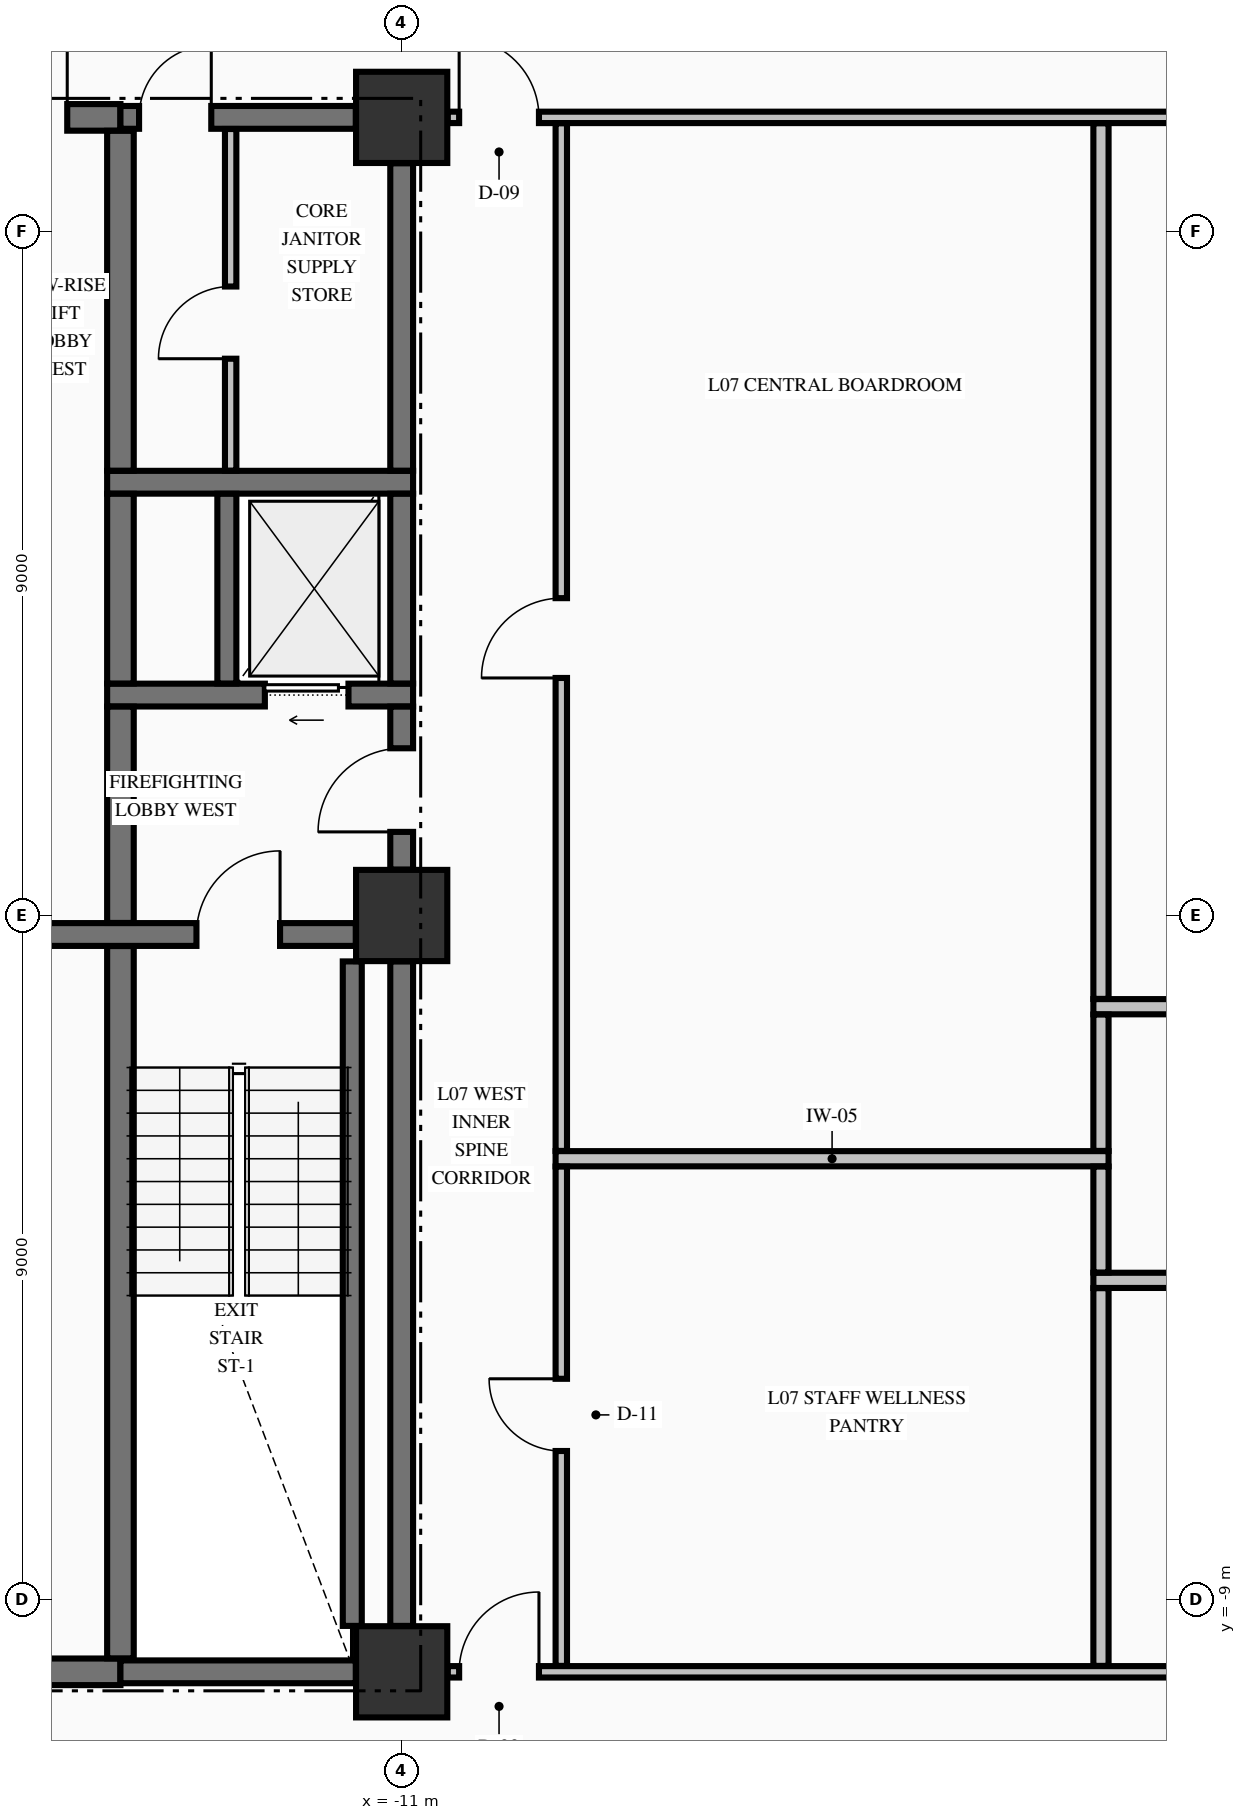
"""IFC4 building model, lengths in metres.
Left out: names, types, materials, properties, quantities, classifications, styles, units other than length and angle.
Written with IfcOpenShell. Run it as: python <this file> out.ifc"""

import sys

from ifc_helpers import new_model, si_unit, direction, frame, frame_2d, origin, origin_2d, place, context, subcontext, project, spatial, rectangle, extrude, element, fill, save


model = new_model("IFC4")
c1 = context("Model", 3, precision=1e-05, world=origin(), true_north=direction((0.0, 1.0)))
c2 = subcontext(c1, "Body", "Model", "MODEL_VIEW")
j1 = project(units=[si_unit("LENGTHUNIT", "METRE"), si_unit("PLANEANGLEUNIT", "RADIAN")], contexts=[c1])
p1 = place(None, origin())
s1 = spatial("IfcSite", under=j1, at=p1, CompositionType="ELEMENT")
p2 = place(p1, origin())
s2 = spatial("IfcBuilding", under=s1, at=p2, CompositionType="ELEMENT")
p3 = place(p2, frame((0.0, 0.0, 34.34)))
s3 = spatial("IfcBuildingStorey", under=s2, at=p3, CompositionType="ELEMENT", Elevation=34.34)
for number, where, z_axis, x_axis in (
    (1, (-11.0, -9.95, -0.3), (0.0, 0.0, 1.0), (1.0, 0.0, 0.0)),
    (2, (-11.0, 0.0, -0.3), (0.0, 0.0, 1.0), (1.0, 0.0, 0.0)),
    (3, (-11.0, 10.5, -0.3), (0.0, 0.0, 1.0), (1.0, 0.0, 0.0)),
):
    element("IfcColumn", number, at=place(p3, frame(where, z_axis=z_axis, x_axis=x_axis)), inside=s3, PredefinedType="COLUMN", context=c2, shape_type="SweptSolid", body=[
        extrude(rectangle(XDim=1.2, YDim=1.2, at=origin_2d()), origin(), (0.0, 0.0, 1.0), 3.62),
    ])
p4 = place(p3, frame((-19.396, -9.95, 0.0), z_axis=(0.0, 0.0, 1.0), x_axis=(1.0, 0.0, 0.0)))
e4 = element("IfcWall", 4, at=p4, inside=s3, PredefinedType="SHEAR", context=c2, shape_type="SweptSolid", body=[
    extrude(rectangle(XDim=4.696, YDim=0.35, at=frame_2d((2.348, 0.0))), origin(), (0.0, 0.0, 1.0), 3.32),
])
p5 = place(p4, frame((0.571, 0.0, 0.0)))
e5 = element("IfcOpeningElement", 5, at=p5, cuts=e4, PredefinedType="OPENING", context=c2, shape_type="SweptSolid", body=[
    extrude(rectangle(XDim=1.05, YDim=2.15, at=frame_2d((0.525, 1.075))), frame((0.0, 0.185, 0.0), z_axis=(0.0, -1.0, 0.0), x_axis=(1.0, 0.0, 0.0)), (0.0, 0.0, 1.0), 0.37),
])
p6 = place(p3, frame((-14.7, -9.95, 0.0), z_axis=(0.0, 0.0, 1.0), x_axis=(1.0, 0.0, 0.0)))
e6 = element("IfcWall", 6, at=p6, inside=s3, PredefinedType="SHEAR", context=c2, shape_type="SweptSolid", body=[
    extrude(rectangle(XDim=3.096, YDim=0.3, at=frame_2d((1.548, 0.0))), origin(), (0.0, 0.0, 1.0), 3.32),
])
p7 = place(p3, frame((-19.396, -0.25, 0.0), z_axis=(0.0, 0.0, 1.0), x_axis=(1.0, 0.0, 0.0)))
e7 = element("IfcWall", 7, at=p7, inside=s3, PredefinedType="SHEAR", context=c2, shape_type="SweptSolid", body=[
    extrude(rectangle(XDim=7.792, YDim=0.3, at=frame_2d((3.896, 0.0))), origin(), (0.0, 0.0, 1.0), 3.32),
])
p8 = place(p7, frame((5.696, 0.0, 0.0)))
e8 = element("IfcOpeningElement", 8, at=p8, cuts=e7, PredefinedType="OPENING", context=c2, shape_type="SweptSolid", body=[
    extrude(rectangle(XDim=1.1, YDim=2.15, at=frame_2d((0.55, 1.075))), frame((0.0, 0.16, 0.0), z_axis=(0.0, -1.0, 0.0), x_axis=(1.0, 0.0, 0.0)), (0.0, 0.0, 1.0), 0.32),
])
p9 = place(p3, frame((-14.875, 2.9, 0.0), z_axis=(0.0, 0.0, 1.0), x_axis=(1.0, 0.0, 0.0)))
e9 = element("IfcWall", 9, at=p9, inside=s3, PredefinedType="SHEAR", context=c2, shape_type="SweptSolid", body=[
    extrude(rectangle(XDim=4.025, YDim=0.3, at=frame_2d((2.012, 0.0))), origin(), (0.0, 0.0, 1.0), 3.32),
])
p10 = place(p9, frame((2.075, 0.0, 0.0)))
e10 = element("IfcOpeningElement", 10, at=p10, cuts=e9, PredefinedType="OPENING", context=c2, shape_type="SweptSolid", body=[
    extrude(rectangle(XDim=1.1, YDim=2.2, at=frame_2d((0.55, 1.1))), frame((0.0, 0.16, 0.0), z_axis=(0.0, -1.0, 0.0), x_axis=(1.0, 0.0, 0.0)), (0.0, 0.0, 1.0), 0.32),
])
p11 = place(p3, frame((-14.875, 5.7, 0.0), z_axis=(0.0, 0.0, 1.0), x_axis=(1.0, 0.0, 0.0)))
e11 = element("IfcWall", 11, at=p11, inside=s3, PredefinedType="SHEAR", context=c2, shape_type="SweptSolid", body=[
    extrude(rectangle(XDim=4.025, YDim=0.3, at=frame_2d((2.012, 0.0))), origin(), (0.0, 0.0, 1.0), 3.32),
])
p12 = place(p3, frame((-19.396, 10.5, 0.0), z_axis=(0.0, 0.0, 1.0), x_axis=(1.0, 0.0, 0.0)))
e12 = element("IfcWall", 12, at=p12, inside=s3, PredefinedType="SHEAR", context=c2, shape_type="SweptSolid", body=[
    extrude(rectangle(XDim=4.696, YDim=0.35, at=frame_2d((2.348, 0.0))), origin(), (0.0, 0.0, 1.0), 3.32),
])
p13 = place(p12, frame((2.796, 0.0, 0.0)))
e13 = element("IfcOpeningElement", 13, at=p13, cuts=e12, PredefinedType="OPENING", context=c2, shape_type="SweptSolid", body=[
    extrude(rectangle(XDim=1.2, YDim=2.15, at=frame_2d((0.6, 1.075))), frame((0.0, 0.185, 0.0), z_axis=(0.0, -1.0, 0.0), x_axis=(1.0, 0.0, 0.0)), (0.0, 0.0, 1.0), 0.37),
])
p14 = place(p3, frame((-14.7, 10.5, 0.0), z_axis=(0.0, 0.0, 1.0), x_axis=(1.0, 0.0, 0.0)))
e14 = element("IfcWall", 14, at=p14, inside=s3, PredefinedType="SHEAR", context=c2, shape_type="SweptSolid", body=[
    extrude(rectangle(XDim=3.096, YDim=0.3, at=frame_2d((1.548, 0.0))), origin(), (0.0, 0.0, 1.0), 3.32),
])
p15 = place(p14, frame((0.245, 0.0, 0.0)))
e15 = element("IfcOpeningElement", 15, at=p15, cuts=e14, PredefinedType="OPENING", context=c2, shape_type="SweptSolid", body=[
    extrude(rectangle(XDim=0.95, YDim=2.15, at=frame_2d((0.475, 1.075))), frame((0.0, 0.16, 0.0), z_axis=(0.0, -1.0, 0.0), x_axis=(1.0, 0.0, 0.0)), (0.0, 0.0, 1.0), 0.32),
])
p16 = place(p3, frame((-10.394, -9.95, 0.0), z_axis=(0.0, 0.0, 1.0), x_axis=(1.0, 0.0, 0.0)))
e16 = element("IfcWall", 16, at=p16, inside=s3, PredefinedType="PARTITIONING", context=c2, shape_type="SweptSolid", body=[
    extrude(rectangle(XDim=20.788, YDim=0.15, at=frame_2d((10.394, 0.0))), origin(), (0.0, 0.0, 1.0), 3.32),
])
p17 = place(p16, frame((0.15, 0.0, 0.0)))
e17 = element("IfcOpeningElement", 17, at=p17, cuts=e16, PredefinedType="OPENING", context=c2, shape_type="SweptSolid", body=[
    extrude(rectangle(XDim=1.05, YDim=2.15, at=frame_2d((0.525, 1.075))), frame((0.0, 0.085, 0.0), z_axis=(0.0, -1.0, 0.0), x_axis=(1.0, 0.0, 0.0)), (0.0, 0.0, 1.0), 0.17),
])
p18 = place(p16, frame((19.588, 0.0, 0.0)))
e18 = element("IfcOpeningElement", 18, at=p18, cuts=e16, PredefinedType="OPENING", context=c2, shape_type="SweptSolid", body=[
    extrude(rectangle(XDim=1.05, YDim=2.15, at=frame_2d((0.525, 1.075))), frame((0.0, 0.085, 0.0), z_axis=(0.0, -1.0, 0.0), x_axis=(1.0, 0.0, 0.0)), (0.0, 0.0, 1.0), 0.17),
])
p19 = place(p16, frame((11.969, 0.0, 0.0)))
e19 = element("IfcOpeningElement", 19, at=p19, cuts=e16, PredefinedType="OPENING", context=c2, shape_type="SweptSolid", body=[
    extrude(rectangle(XDim=0.95, YDim=2.15, at=frame_2d((0.475, 1.075))), frame((0.0, 0.085, 0.0), z_axis=(0.0, -1.0, 0.0), x_axis=(1.0, 0.0, 0.0)), (0.0, 0.0, 1.0), 0.17),
])
p20 = place(p3, frame((-1.9, -4.8, 0.0), z_axis=(0.0, 0.0, 1.0), x_axis=(1.0, 0.0, 0.0)))
e20 = element("IfcWall", 20, at=p20, inside=s3, PredefinedType="PARTITIONING", context=c2, shape_type="SweptSolid", body=[
    extrude(rectangle(XDim=10.875, YDim=0.2, at=frame_2d((5.438, 0.0))), origin(), (0.0, 0.0, 1.0), 3.32),
])
p21 = place(p3, frame((-8.975, -3.2, 0.0), z_axis=(0.0, 0.0, 1.0), x_axis=(1.0, 0.0, 0.0)))
e21 = element("IfcWall", 21, at=p21, inside=s3, PredefinedType="PARTITIONING", context=c2, shape_type="SweptSolid", body=[
    extrude(rectangle(XDim=7.275, YDim=0.2, at=frame_2d((3.638, 0.0))), origin(), (0.0, 0.0, 1.0), 3.32),
])
p22 = place(p3, frame((-1.9, -1.2, 0.0), z_axis=(0.0, 0.0, 1.0), x_axis=(1.0, 0.0, 0.0)))
e22 = element("IfcWall", 22, at=p22, inside=s3, PredefinedType="PARTITIONING", context=c2, shape_type="SweptSolid", body=[
    extrude(rectangle(XDim=10.875, YDim=0.2, at=frame_2d((5.438, 0.0))), origin(), (0.0, 0.0, 1.0), 3.32),
])
p23 = place(p3, frame((-10.394, 10.5, 0.0), z_axis=(0.0, 0.0, 1.0), x_axis=(1.0, 0.0, 0.0)))
e23 = element("IfcWall", 23, at=p23, inside=s3, PredefinedType="PARTITIONING", context=c2, shape_type="SweptSolid", body=[
    extrude(rectangle(XDim=20.788, YDim=0.15, at=frame_2d((10.394, 0.0))), origin(), (0.0, 0.0, 1.0), 3.32),
])
p24 = place(p23, frame((0.15, 0.0, 0.0)))
e24 = element("IfcOpeningElement", 24, at=p24, cuts=e23, PredefinedType="OPENING", context=c2, shape_type="SweptSolid", body=[
    extrude(rectangle(XDim=1.05, YDim=2.15, at=frame_2d((0.525, 1.075))), frame((0.0, 0.085, 0.0), z_axis=(0.0, -1.0, 0.0), x_axis=(1.0, 0.0, 0.0)), (0.0, 0.0, 1.0), 0.17),
])
p25 = place(p23, frame((19.588, 0.0, 0.0)))
e25 = element("IfcOpeningElement", 25, at=p25, cuts=e23, PredefinedType="OPENING", context=c2, shape_type="SweptSolid", body=[
    extrude(rectangle(XDim=1.05, YDim=2.15, at=frame_2d((0.525, 1.075))), frame((0.0, 0.085, 0.0), z_axis=(0.0, -1.0, 0.0), x_axis=(1.0, 0.0, 0.0)), (0.0, 0.0, 1.0), 0.17),
])
p26 = place(p3, frame((-14.7, -9.773, 0.0), z_axis=(0.0, 0.0, 1.0), x_axis=(0.0, 1.0, 0.0)))
e26 = element("IfcWall", 26, at=p26, inside=s3, PredefinedType="SHEAR", context=c2, shape_type="SweptSolid", body=[
    extrude(rectangle(XDim=9.371, YDim=0.35, at=frame_2d((4.686, 0.0))), origin(), (0.0, 0.0, 1.0), 3.32),
])
p27 = place(p3, frame((-14.7, -0.098, 0.0), z_axis=(0.0, 0.0, 1.0), x_axis=(0.0, 1.0, 0.0)))
e27 = element("IfcWall", 27, at=p27, inside=s3, PredefinedType="SHEAR", context=c2, shape_type="SweptSolid", body=[
    extrude(rectangle(XDim=2.846, YDim=0.35, at=frame_2d((1.423, 0.0))), origin(), (0.0, 0.0, 1.0), 3.32),
])
p28 = place(p3, frame((-14.7, 3.052, 0.0), z_axis=(0.0, 0.0, 1.0), x_axis=(0.0, 1.0, 0.0)))
e28 = element("IfcWall", 28, at=p28, inside=s3, PredefinedType="SHEAR", context=c2, shape_type="SweptSolid", body=[
    extrude(rectangle(XDim=2.496, YDim=0.35, at=frame_2d((1.248, 0.0))), origin(), (0.0, 0.0, 1.0), 3.32),
])
p29 = place(p3, frame((-14.7, 5.852, 0.0), z_axis=(0.0, 0.0, 1.0), x_axis=(0.0, 1.0, 0.0)))
e29 = element("IfcWall", 29, at=p29, inside=s3, PredefinedType="SHEAR", context=c2, shape_type="SweptSolid", body=[
    extrude(rectangle(XDim=4.471, YDim=0.35, at=frame_2d((2.235, 0.0))), origin(), (0.0, 0.0, 1.0), 3.32),
])
p30 = place(p3, frame((-13.3, 3.052, 0.0), z_axis=(0.0, 0.0, 1.0), x_axis=(0.0, 1.0, 0.0)))
e30 = element("IfcWall", 30, at=p30, inside=s3, PredefinedType="SOLIDWALL", context=c2, shape_type="SweptSolid", body=[
    extrude(rectangle(XDim=2.496, YDim=0.25, at=frame_2d((1.248, 0.0))), origin(), (0.0, 0.0, 1.0), 3.32),
])
p31 = place(p3, frame((-11.65, -9.346, 0.0), z_axis=(0.0, 0.0, 1.0), x_axis=(0.0, 1.0, 0.0)))
e31 = element("IfcWall", 31, at=p31, inside=s3, PredefinedType="SOLIDWALL", context=c2, shape_type="SweptSolid", body=[
    extrude(rectangle(XDim=8.742, YDim=0.25, at=frame_2d((4.371, 0.0))), origin(), (0.0, 0.0, 1.0), 3.32),
])
p32 = place(p3, frame((-11.0, -9.346, 0.0), z_axis=(0.0, 0.0, 1.0), x_axis=(0.0, 1.0, 0.0)))
e32 = element("IfcWall", 32, at=p32, inside=s3, PredefinedType="SHEAR", context=c2, shape_type="SweptSolid", body=[
    extrude(rectangle(XDim=8.742, YDim=0.3, at=frame_2d((4.371, 0.0))), origin(), (0.0, 0.0, 1.0), 3.32),
])
p33 = place(p3, frame((-11.0, 0.604, 0.0), z_axis=(0.0, 0.0, 1.0), x_axis=(0.0, 1.0, 0.0)))
e33 = element("IfcWall", 33, at=p33, inside=s3, PredefinedType="SHEAR", context=c2, shape_type="SweptSolid", body=[
    extrude(rectangle(XDim=2.144, YDim=0.3, at=frame_2d((1.072, 0.0))), origin(), (0.0, 0.0, 1.0), 3.32),
])
p34 = place(p33, frame((0.496, 0.0, 0.0)))
e34 = element("IfcOpeningElement", 34, at=p34, cuts=e33, PredefinedType="OPENING", context=c2, shape_type="SweptSolid", body=[
    extrude(rectangle(XDim=1.1, YDim=2.15, at=frame_2d((0.55, 1.075))), frame((0.0, 0.16, 0.0), z_axis=(0.0, -1.0, 0.0), x_axis=(1.0, 0.0, 0.0)), (0.0, 0.0, 1.0), 0.32),
])
p35 = place(p3, frame((-11.0, 3.052, 0.0), z_axis=(0.0, 0.0, 1.0), x_axis=(0.0, 1.0, 0.0)))
e35 = element("IfcWall", 35, at=p35, inside=s3, PredefinedType="SHEAR", context=c2, shape_type="SweptSolid", body=[
    extrude(rectangle(XDim=2.496, YDim=0.3, at=frame_2d((1.248, 0.0))), origin(), (0.0, 0.0, 1.0), 3.32),
])
p36 = place(p3, frame((-11.0, 5.852, 0.0), z_axis=(0.0, 0.0, 1.0), x_axis=(0.0, 1.0, 0.0)))
e36 = element("IfcWall", 36, at=p36, inside=s3, PredefinedType="SHEAR", context=c2, shape_type="SweptSolid", body=[
    extrude(rectangle(XDim=4.044, YDim=0.3, at=frame_2d((2.022, 0.0))), origin(), (0.0, 0.0, 1.0), 3.32),
])
p37 = place(p3, frame((-13.25, 5.853, 0.0), z_axis=(0.0, 0.0, 1.0), x_axis=(0.0, 1.0, 0.0)))
e37 = element("IfcWall", 37, at=p37, inside=s3, PredefinedType="PARTITIONING", context=c2, shape_type="SweptSolid", body=[
    extrude(rectangle(XDim=4.494, YDim=0.15, at=frame_2d((2.247, 0.0))), origin(), (0.0, 0.0, 1.0), 3.32),
])
p38 = place(p37, frame((1.472, 0.0, 0.0)))
e38 = element("IfcOpeningElement", 38, at=p38, cuts=e37, PredefinedType="OPENING", context=c2, shape_type="SweptSolid", body=[
    extrude(rectangle(XDim=0.95, YDim=2.15, at=frame_2d((0.475, 1.075))), frame((0.0, 0.085, 0.0), z_axis=(0.0, -1.0, 0.0), x_axis=(1.0, 0.0, 0.0)), (0.0, 0.0, 1.0), 0.17),
])
p39 = place(p3, frame((-8.9, -9.872, 0.0), z_axis=(0.0, 0.0, 1.0), x_axis=(0.0, 1.0, 0.0)))
e39 = element("IfcWall", 39, at=p39, inside=s3, PredefinedType="PARTITIONING", context=c2, shape_type="SweptSolid", body=[
    extrude(rectangle(XDim=6.569, YDim=0.15, at=frame_2d((3.285, 0.0))), origin(), (0.0, 0.0, 1.0), 3.32),
])
p40 = place(p39, frame((2.827, 0.0, 0.0)))
e40 = element("IfcOpeningElement", 40, at=p40, cuts=e39, PredefinedType="OPENING", context=c2, shape_type="SweptSolid", body=[
    extrude(rectangle(XDim=0.95, YDim=2.15, at=frame_2d((0.475, 1.075))), frame((0.0, 0.085, 0.0), z_axis=(0.0, -1.0, 0.0), x_axis=(1.0, 0.0, 0.0)), (0.0, 0.0, 1.0), 0.17),
])
p41 = place(p3, frame((-8.9, -3.097, 0.0), z_axis=(0.0, 0.0, 1.0), x_axis=(0.0, 1.0, 0.0)))
e41 = element("IfcWall", 41, at=p41, inside=s3, PredefinedType="PARTITIONING", context=c2, shape_type="SweptSolid", body=[
    extrude(rectangle(XDim=13.519, YDim=0.15, at=frame_2d((6.76, 0.0))), origin(), (0.0, 0.0, 1.0), 3.32),
])
p42 = place(p41, frame((6.222, 0.0, 0.0)))
e42 = element("IfcOpeningElement", 42, at=p42, cuts=e41, PredefinedType="OPENING", context=c2, shape_type="SweptSolid", body=[
    extrude(rectangle(XDim=1.05, YDim=2.15, at=frame_2d((0.525, 1.075))), frame((0.0, 0.085, 0.0), z_axis=(0.0, -1.0, 0.0), x_axis=(1.0, 0.0, 0.0)), (0.0, 0.0, 1.0), 0.17),
])
p43 = place(p3, frame((-1.8, -9.872, 0.0), z_axis=(0.0, 0.0, 1.0), x_axis=(0.0, 1.0, 0.0)))
e43 = element("IfcWall", 43, at=p43, inside=s3, PredefinedType="PARTITIONING", context=c2, shape_type="SweptSolid", body=[
    extrude(rectangle(XDim=4.969, YDim=0.2, at=frame_2d((2.484, 0.0))), origin(), (0.0, 0.0, 1.0), 3.32),
])
p44 = place(p3, frame((-1.8, -4.697, 0.0), z_axis=(0.0, 0.0, 1.0), x_axis=(0.0, 1.0, 0.0)))
e44 = element("IfcWall", 44, at=p44, inside=s3, PredefinedType="PARTITIONING", context=c2, shape_type="SweptSolid", body=[
    extrude(rectangle(XDim=1.394, YDim=0.2, at=frame_2d((0.697, 0.0))), origin(), (0.0, 0.0, 1.0), 3.32),
])
p45 = place(p3, frame((-1.8, -3.097, 0.0), z_axis=(0.0, 0.0, 1.0), x_axis=(0.0, 1.0, 0.0)))
e45 = element("IfcWall", 45, at=p45, inside=s3, PredefinedType="PARTITIONING", context=c2, shape_type="SweptSolid", body=[
    extrude(rectangle(XDim=1.794, YDim=0.2, at=frame_2d((0.897, 0.0))), origin(), (0.0, 0.0, 1.0), 3.32),
])
p46 = place(p3, frame((-1.8, -1.097, 0.0), z_axis=(0.0, 0.0, 1.0), x_axis=(0.0, 1.0, 0.0)))
e46 = element("IfcWall", 46, at=p46, inside=s3, PredefinedType="PARTITIONING", context=c2, shape_type="SweptSolid", body=[
    extrude(rectangle(XDim=11.519, YDim=0.2, at=frame_2d((5.76, 0.0))), origin(), (0.0, 0.0, 1.0), 3.32),
])
p47 = place(p8, origin())
e47 = element("IfcDoor", 47, at=p47, inside=s3, OperationType="SINGLE_SWING_RIGHT", PredefinedType="DOOR", context=c2, shape_type="SweptSolid", body=[
    extrude(rectangle(XDim=1.1, YDim=2.15, at=frame_2d((0.55, 1.075))), frame((0.0, 0.025, 0.0), z_axis=(0.0, -1.0, 0.0), x_axis=(1.0, 0.0, 0.0)), (0.0, 0.0, 1.0), 0.05),
])
fill(e8, e47)
p48 = place(p34, origin())
e48 = element("IfcDoor", 48, at=p48, inside=s3, OperationType="SINGLE_SWING_LEFT", PredefinedType="DOOR", context=c2, shape_type="SweptSolid", body=[
    extrude(rectangle(XDim=1.1, YDim=2.15, at=frame_2d((0.55, 1.075))), frame((0.0, 0.025, 0.0), z_axis=(0.0, -1.0, 0.0), x_axis=(1.0, 0.0, 0.0)), (0.0, 0.0, 1.0), 0.05),
])
fill(e34, e48)
p49 = place(p10, origin())
e49 = element("IfcDoor", 49, at=p49, inside=s3, OperationType="SLIDING_TO_LEFT", PredefinedType="DOOR", context=c2, shape_type="SweptSolid", body=[
    extrude(rectangle(XDim=1.1, YDim=2.2, at=frame_2d((0.55, 1.1))), frame((0.0, 0.025, 0.0), z_axis=(0.0, -1.0, 0.0), x_axis=(1.0, 0.0, 0.0)), (0.0, 0.0, 1.0), 0.05),
])
fill(e10, e49)
p50 = place(p15, origin())
e50 = element("IfcDoor", 50, at=p50, inside=s3, OperationType="SINGLE_SWING_RIGHT", PredefinedType="DOOR", context=c2, shape_type="SweptSolid", body=[
    extrude(rectangle(XDim=0.95, YDim=2.15, at=frame_2d((0.475, 1.075))), frame((0.0, 0.025, 0.0), z_axis=(0.0, -1.0, 0.0), x_axis=(1.0, 0.0, 0.0)), (0.0, 0.0, 1.0), 0.05),
])
fill(e15, e50)
p51 = place(p38, origin())
e51 = element("IfcDoor", 51, at=p51, inside=s3, OperationType="SINGLE_SWING_LEFT", PredefinedType="DOOR", context=c2, shape_type="SweptSolid", body=[
    extrude(rectangle(XDim=0.95, YDim=2.15, at=frame_2d((0.475, 1.075))), frame((0.0, 0.025, 0.0), z_axis=(0.0, -1.0, 0.0), x_axis=(1.0, 0.0, 0.0)), (0.0, 0.0, 1.0), 0.05),
])
fill(e38, e51)
p52 = place(p13, origin())
e52 = element("IfcDoor", 52, at=p52, inside=s3, OperationType="SINGLE_SWING_RIGHT", PredefinedType="DOOR", context=c2, shape_type="SweptSolid", body=[
    extrude(rectangle(XDim=1.2, YDim=2.15, at=frame_2d((0.6, 1.075))), frame((0.0, 0.025, 0.0), z_axis=(0.0, -1.0, 0.0), x_axis=(1.0, 0.0, 0.0)), (0.0, 0.0, 1.0), 0.05),
])
fill(e13, e52)
p53 = place(p24, origin())
e53 = element("IfcDoor", 53, at=p53, inside=s3, OperationType="SINGLE_SWING_LEFT", PredefinedType="DOOR", context=c2, shape_type="SweptSolid", body=[
    extrude(rectangle(XDim=1.05, YDim=2.15, at=frame_2d((0.525, 1.075))), frame((0.0, 0.025, 0.0), z_axis=(0.0, -1.0, 0.0), x_axis=(1.0, 0.0, 0.0)), (0.0, 0.0, 1.0), 0.05),
])
fill(e24, e53)
p54 = place(p17, origin())
e54 = element("IfcDoor", 54, at=p54, inside=s3, OperationType="SINGLE_SWING_RIGHT", PredefinedType="DOOR", context=c2, shape_type="SweptSolid", body=[
    extrude(rectangle(XDim=1.05, YDim=2.15, at=frame_2d((0.525, 1.075))), frame((0.0, 0.025, 0.0), z_axis=(0.0, -1.0, 0.0), x_axis=(1.0, 0.0, 0.0)), (0.0, 0.0, 1.0), 0.05),
])
fill(e17, e54)
p55 = place(p42, origin())
e55 = element("IfcDoor", 55, at=p55, inside=s3, OperationType="SINGLE_SWING_LEFT", PredefinedType="DOOR", context=c2, shape_type="SweptSolid", body=[
    extrude(rectangle(XDim=1.05, YDim=2.15, at=frame_2d((0.525, 1.075))), frame((0.0, 0.025, 0.0), z_axis=(0.0, -1.0, 0.0), x_axis=(1.0, 0.0, 0.0)), (0.0, 0.0, 1.0), 0.05),
])
fill(e42, e55)
p56 = place(p40, origin())
e56 = element("IfcDoor", 56, at=p56, inside=s3, OperationType="SINGLE_SWING_RIGHT", PredefinedType="DOOR", context=c2, shape_type="SweptSolid", body=[
    extrude(rectangle(XDim=0.95, YDim=2.15, at=frame_2d((0.475, 1.075))), frame((0.0, 0.025, 0.0), z_axis=(0.0, -1.0, 0.0), x_axis=(1.0, 0.0, 0.0)), (0.0, 0.0, 1.0), 0.05),
])
fill(e40, e56)
save(model, sys.argv[1])
